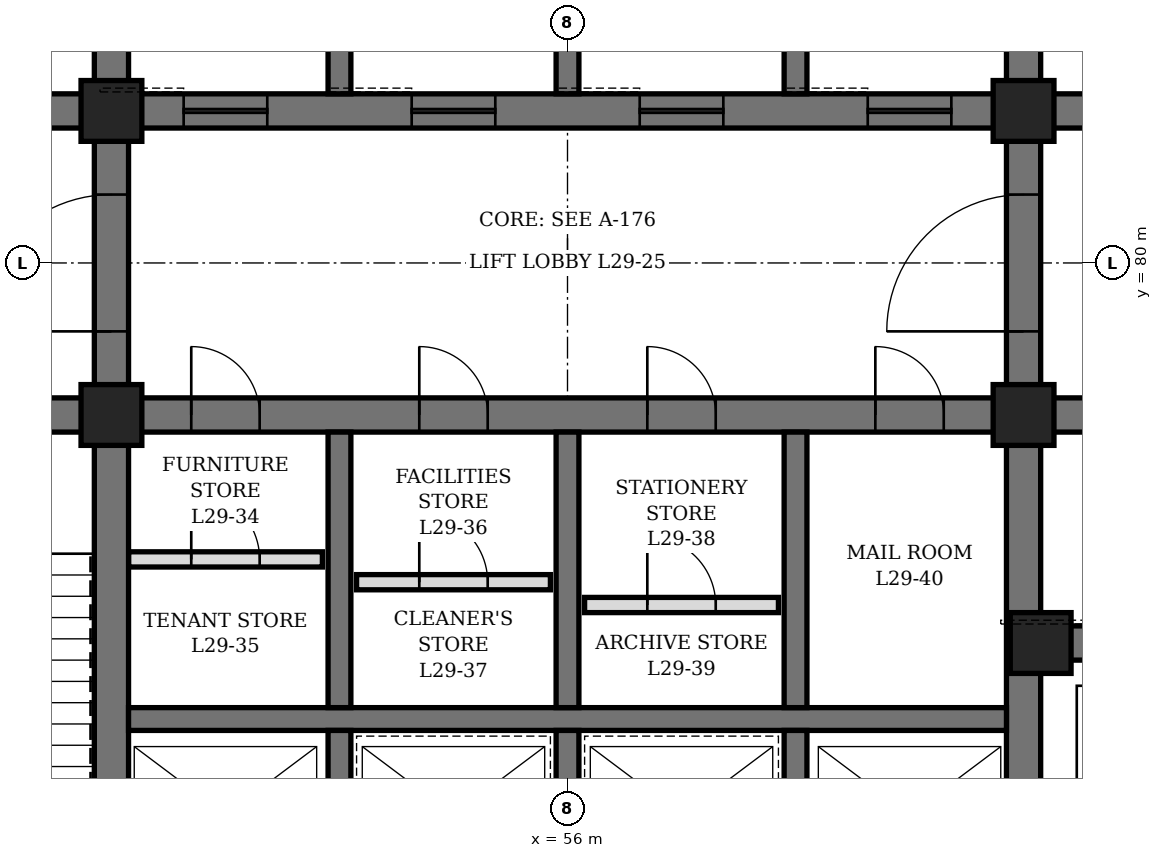
"""IFC4 building model, lengths in metres.
Left out: names, types, materials, properties, quantities, classifications, styles, units other than length and angle.
Written with IfcOpenShell. Run it as: python <this file> out.ifc"""

import sys

from ifc_helpers import new_model, si_unit, direction, frame, frame_2d, origin, origin_2d, place, context, subcontext, project, spatial, rectangle, hollow_rectangle, extrude, element, fill, save


model = new_model("IFC4")
c1 = context("Model", 3, precision=1e-05, world=origin(), true_north=direction((0.0, 1.0)))
c2 = subcontext(c1, "Body", "Model", "MODEL_VIEW")
j1 = project(units=[si_unit("LENGTHUNIT", "METRE"), si_unit("PLANEANGLEUNIT", "RADIAN")], contexts=[c1])
p1 = place(None, origin())
s1 = spatial("IfcSite", under=j1, at=p1, CompositionType="ELEMENT")
p2 = place(p1, origin())
s2 = spatial("IfcBuilding", under=s1, at=p2, CompositionType="ELEMENT")
p3 = place(p2, frame((0.0, 0.0, 133.3)))
s3 = spatial("IfcBuildingStorey", under=s2, at=p3, CompositionType="ELEMENT", Elevation=133.3)
p4 = place(p3, frame((50.0, 71.6, 0.0), z_axis=(0.0, 0.0, 1.0), x_axis=(0.0, 1.0, 0.0)))
e1 = element("IfcWall", 1, at=p4, inside=s3, PredefinedType="SHEAR", context=c2, shape_type="SweptSolid", body=[
    extrude(rectangle(XDim=16.8, YDim=0.45, at=frame_2d((8.4, 0.0))), origin(), (0.0, 0.0, 1.0), 4.2),
])
p5 = place(p4, frame((7.5, 0.0, 0.0)))
e2 = element("IfcOpeningElement", 2, at=p5, cuts=e1, PredefinedType="OPENING", context=c2, shape_type="SweptSolid", body=[
    extrude(rectangle(XDim=1.8, YDim=2.4, at=frame_2d((0.9, 1.2))), frame((0.0, 0.235, 0.0), z_axis=(0.0, -1.0, 0.0), x_axis=(1.0, 0.0, 0.0)), (0.0, 0.0, 1.0), 0.47),
])
p6 = place(p3, frame((62.0, 71.6, 0.0), z_axis=(0.0, 0.0, 1.0), x_axis=(0.0, 1.0, 0.0)))
e3 = element("IfcWall", 3, at=p6, inside=s3, PredefinedType="SHEAR", context=c2, shape_type="SweptSolid", body=[
    extrude(rectangle(XDim=16.8, YDim=0.45, at=frame_2d((8.4, 0.0))), origin(), (0.0, 0.0, 1.0), 4.2),
])
p7 = place(p6, frame((7.5, 0.0, 0.0)))
e4 = element("IfcOpeningElement", 4, at=p7, cuts=e3, PredefinedType="OPENING", context=c2, shape_type="SweptSolid", body=[
    extrude(rectangle(XDim=1.8, YDim=2.4, at=frame_2d((0.9, 1.2))), frame((0.0, 0.235, 0.0), z_axis=(0.0, -1.0, 0.0), x_axis=(1.0, 0.0, 0.0)), (0.0, 0.0, 1.0), 0.47),
])
p8 = place(p3, frame((44.6, 78.0, 0.0), z_axis=(0.0, 0.0, 1.0), x_axis=(1.0, 0.0, 0.0)))
e5 = element("IfcWall", 5, at=p8, inside=s3, PredefinedType="SHEAR", context=c2, shape_type="SweptSolid", body=[
    extrude(rectangle(XDim=5.175, YDim=0.45, at=frame_2d((2.587, 0.0))), origin(), (0.0, 0.0, 1.0), 4.2),
])
p9 = place(p8, frame((1.8, 0.0, 0.0)))
e6 = element("IfcOpeningElement", 6, at=p9, cuts=e5, PredefinedType="OPENING", context=c2, shape_type="SweptSolid", body=[
    extrude(rectangle(XDim=1.2, YDim=2.1, at=frame_2d((0.6, 1.05))), frame((0.0, 0.235, 0.0), z_axis=(0.0, -1.0, 0.0), x_axis=(1.0, 0.0, 0.0)), (0.0, 0.0, 1.0), 0.47),
])
p10 = place(p3, frame((44.6, 82.0, 0.0), z_axis=(0.0, 0.0, 1.0), x_axis=(1.0, 0.0, 0.0)))
e7 = element("IfcWall", 7, at=p10, inside=s3, PredefinedType="SHEAR", context=c2, shape_type="SweptSolid", body=[
    extrude(rectangle(XDim=5.175, YDim=0.45, at=frame_2d((2.587, 0.0))), origin(), (0.0, 0.0, 1.0), 4.2),
])
p11 = place(p10, frame((0.7, 0.0, 0.0)))
e8 = element("IfcOpeningElement", 8, at=p11, cuts=e7, PredefinedType="OPENING", context=c2, shape_type="SweptSolid", body=[
    extrude(rectangle(XDim=0.9, YDim=2.1, at=frame_2d((0.45, 1.05))), frame((0.0, 0.235, 0.0), z_axis=(0.0, -1.0, 0.0), x_axis=(1.0, 0.0, 0.0)), (0.0, 0.0, 1.0), 0.47),
])
p12 = place(p3, frame((62.225, 75.0, 0.0), z_axis=(0.0, 0.0, 1.0), x_axis=(1.0, 0.0, 0.0)))
e9 = element("IfcWall", 9, at=p12, inside=s3, PredefinedType="SHEAR", context=c2, shape_type="SweptSolid", body=[
    extrude(rectangle(XDim=5.175, YDim=0.45, at=frame_2d((2.587, 0.0))), origin(), (0.0, 0.0, 1.0), 4.2),
])
p13 = place(p12, frame((0.675, 0.0, 0.0)))
e10 = element("IfcOpeningElement", 10, at=p13, cuts=e9, PredefinedType="OPENING", context=c2, shape_type="SweptSolid", body=[
    extrude(rectangle(XDim=1.2, YDim=2.2, at=frame_2d((0.6, 1.1))), frame((0.0, 0.235, 0.0), z_axis=(0.0, -1.0, 0.0), x_axis=(1.0, 0.0, 0.0)), (0.0, 0.0, 1.0), 0.47),
])
p14 = place(p12, frame((3.425, 0.0, 0.0)))
e11 = element("IfcOpeningElement", 11, at=p14, cuts=e9, PredefinedType="OPENING", context=c2, shape_type="SweptSolid", body=[
    extrude(rectangle(XDim=1.2, YDim=2.2, at=frame_2d((0.6, 1.1))), frame((0.0, 0.235, 0.0), z_axis=(0.0, -1.0, 0.0), x_axis=(1.0, 0.0, 0.0)), (0.0, 0.0, 1.0), 0.47),
])
p15 = place(p3, frame((62.225, 78.0, 0.0), z_axis=(0.0, 0.0, 1.0), x_axis=(1.0, 0.0, 0.0)))
e12 = element("IfcWall", 12, at=p15, inside=s3, PredefinedType="SHEAR", context=c2, shape_type="SweptSolid", body=[
    extrude(rectangle(XDim=5.175, YDim=0.45, at=frame_2d((2.587, 0.0))), origin(), (0.0, 0.0, 1.0), 4.2),
])
p16 = place(p15, frame((2.175, 0.0, 0.0)))
e13 = element("IfcOpeningElement", 13, at=p16, cuts=e12, PredefinedType="OPENING", context=c2, shape_type="SweptSolid", body=[
    extrude(rectangle(XDim=1.2, YDim=2.1, at=frame_2d((0.6, 1.05))), frame((0.0, 0.235, 0.0), z_axis=(0.0, -1.0, 0.0), x_axis=(1.0, 0.0, 0.0)), (0.0, 0.0, 1.0), 0.47),
])
p17 = place(p3, frame((62.225, 82.0, 0.0), z_axis=(0.0, 0.0, 1.0), x_axis=(1.0, 0.0, 0.0)))
e14 = element("IfcWall", 14, at=p17, inside=s3, PredefinedType="SHEAR", context=c2, shape_type="SweptSolid", body=[
    extrude(rectangle(XDim=5.175, YDim=0.45, at=frame_2d((2.587, 0.0))), origin(), (0.0, 0.0, 1.0), 4.2),
])
p18 = place(p17, frame((2.175, 0.0, 0.0)))
e15 = element("IfcOpeningElement", 15, at=p18, cuts=e14, PredefinedType="OPENING", context=c2, shape_type="SweptSolid", body=[
    extrude(rectangle(XDim=1.2, YDim=2.1, at=frame_2d((0.6, 1.05))), frame((0.0, 0.235, 0.0), z_axis=(0.0, -1.0, 0.0), x_axis=(1.0, 0.0, 0.0)), (0.0, 0.0, 1.0), 0.47),
])
p19 = place(p3, frame((50.225, 78.0, 0.0), z_axis=(0.0, 0.0, 1.0), x_axis=(1.0, 0.0, 0.0)))
e16 = element("IfcWall", 16, at=p19, inside=s3, PredefinedType="SHEAR", context=c2, shape_type="SweptSolid", body=[
    extrude(rectangle(XDim=11.55, YDim=0.45, at=frame_2d((5.775, 0.0))), origin(), (0.0, 0.0, 1.0), 4.2),
])
p20 = place(p19, frame((0.825, 0.0, 0.0)))
e17 = element("IfcOpeningElement", 17, at=p20, cuts=e16, PredefinedType="OPENING", context=c2, shape_type="SweptSolid", body=[
    extrude(rectangle(XDim=0.9, YDim=2.1, at=frame_2d((0.45, 1.05))), frame((0.0, 0.235, 0.0), z_axis=(0.0, -1.0, 0.0), x_axis=(1.0, 0.0, 0.0)), (0.0, 0.0, 1.0), 0.47),
])
p21 = place(p19, frame((3.825, 0.0, 0.0)))
e18 = element("IfcOpeningElement", 18, at=p21, cuts=e16, PredefinedType="OPENING", context=c2, shape_type="SweptSolid", body=[
    extrude(rectangle(XDim=0.9, YDim=2.1, at=frame_2d((0.45, 1.05))), frame((0.0, 0.235, 0.0), z_axis=(0.0, -1.0, 0.0), x_axis=(1.0, 0.0, 0.0)), (0.0, 0.0, 1.0), 0.47),
])
p22 = place(p19, frame((6.825, 0.0, 0.0)))
e19 = element("IfcOpeningElement", 19, at=p22, cuts=e16, PredefinedType="OPENING", context=c2, shape_type="SweptSolid", body=[
    extrude(rectangle(XDim=0.9, YDim=2.1, at=frame_2d((0.45, 1.05))), frame((0.0, 0.235, 0.0), z_axis=(0.0, -1.0, 0.0), x_axis=(1.0, 0.0, 0.0)), (0.0, 0.0, 1.0), 0.47),
])
p23 = place(p19, frame((9.825, 0.0, 0.0)))
e20 = element("IfcOpeningElement", 20, at=p23, cuts=e16, PredefinedType="OPENING", context=c2, shape_type="SweptSolid", body=[
    extrude(rectangle(XDim=0.9, YDim=2.1, at=frame_2d((0.45, 1.05))), frame((0.0, 0.235, 0.0), z_axis=(0.0, -1.0, 0.0), x_axis=(1.0, 0.0, 0.0)), (0.0, 0.0, 1.0), 0.47),
])
p24 = place(p3, frame((50.225, 82.0, 0.0), z_axis=(0.0, 0.0, 1.0), x_axis=(1.0, 0.0, 0.0)))
e21 = element("IfcWall", 21, at=p24, inside=s3, PredefinedType="SHEAR", context=c2, shape_type="SweptSolid", body=[
    extrude(rectangle(XDim=11.55, YDim=0.45, at=frame_2d((5.775, 0.0))), origin(), (0.0, 0.0, 1.0), 4.2),
])
p25 = place(p24, frame((0.725, 0.0, 0.0)))
e22 = element("IfcOpeningElement", 22, at=p25, cuts=e21, PredefinedType="OPENING", context=c2, shape_type="SweptSolid", body=[
    extrude(rectangle(XDim=1.1, YDim=2.2, at=frame_2d((0.55, 1.1))), frame((0.0, 0.235, 0.0), z_axis=(0.0, -1.0, 0.0), x_axis=(1.0, 0.0, 0.0)), (0.0, 0.0, 1.0), 0.47),
])
p26 = place(p24, frame((3.725, 0.0, 0.0)))
e23 = element("IfcOpeningElement", 23, at=p26, cuts=e21, PredefinedType="OPENING", context=c2, shape_type="SweptSolid", body=[
    extrude(rectangle(XDim=1.1, YDim=2.2, at=frame_2d((0.55, 1.1))), frame((0.0, 0.235, 0.0), z_axis=(0.0, -1.0, 0.0), x_axis=(1.0, 0.0, 0.0)), (0.0, 0.0, 1.0), 0.47),
])
p27 = place(p24, frame((6.725, 0.0, 0.0)))
e24 = element("IfcOpeningElement", 24, at=p27, cuts=e21, PredefinedType="OPENING", context=c2, shape_type="SweptSolid", body=[
    extrude(rectangle(XDim=1.1, YDim=2.2, at=frame_2d((0.55, 1.1))), frame((0.0, 0.235, 0.0), z_axis=(0.0, -1.0, 0.0), x_axis=(1.0, 0.0, 0.0)), (0.0, 0.0, 1.0), 0.47),
])
p28 = place(p24, frame((9.725, 0.0, 0.0)))
e25 = element("IfcOpeningElement", 25, at=p28, cuts=e21, PredefinedType="OPENING", context=c2, shape_type="SweptSolid", body=[
    extrude(rectangle(XDim=1.1, YDim=2.2, at=frame_2d((0.55, 1.1))), frame((0.0, 0.235, 0.0), z_axis=(0.0, -1.0, 0.0), x_axis=(1.0, 0.0, 0.0)), (0.0, 0.0, 1.0), 0.47),
])
p29 = place(p3, frame((50.225, 74.0, 0.0), z_axis=(0.0, 0.0, 1.0), x_axis=(1.0, 0.0, 0.0)))
e26 = element("IfcWall", 26, at=p29, inside=s3, PredefinedType="SHEAR", context=c2, shape_type="SweptSolid", body=[
    extrude(rectangle(XDim=11.55, YDim=0.3, at=frame_2d((5.775, 0.0))), origin(), (0.0, 0.0, 1.0), 4.2),
])
p30 = place(p3, frame((53.0, 71.6, 0.0), z_axis=(0.0, 0.0, 1.0), x_axis=(0.0, 1.0, 0.0)))
e27 = element("IfcWall", 27, at=p30, inside=s3, PredefinedType="SHEAR", context=c2, shape_type="SweptSolid", body=[
    extrude(rectangle(XDim=2.25, YDim=0.3, at=frame_2d((1.125, 0.0))), origin(), (0.0, 0.0, 1.0), 4.2),
])
p31 = place(p3, frame((53.0, 74.15, 0.0), z_axis=(0.0, 0.0, 1.0), x_axis=(0.0, 1.0, 0.0)))
e28 = element("IfcWall", 28, at=p31, inside=s3, PredefinedType="SHEAR", context=c2, shape_type="SweptSolid", body=[
    extrude(rectangle(XDim=3.625, YDim=0.3, at=frame_2d((1.812, 0.0))), origin(), (0.0, 0.0, 1.0), 4.2),
])
p32 = place(p3, frame((53.0, 82.225, 0.0), z_axis=(0.0, 0.0, 1.0), x_axis=(0.0, 1.0, 0.0)))
e29 = element("IfcWall", 29, at=p32, inside=s3, PredefinedType="SHEAR", context=c2, shape_type="SweptSolid", body=[
    extrude(rectangle(XDim=3.55, YDim=0.3, at=frame_2d((1.775, 0.0))), origin(), (0.0, 0.0, 1.0), 4.2),
])
p33 = place(p3, frame((56.0, 71.6, 0.0), z_axis=(0.0, 0.0, 1.0), x_axis=(0.0, 1.0, 0.0)))
e30 = element("IfcWall", 30, at=p33, inside=s3, PredefinedType="SHEAR", context=c2, shape_type="SweptSolid", body=[
    extrude(rectangle(XDim=2.25, YDim=0.3, at=frame_2d((1.125, 0.0))), origin(), (0.0, 0.0, 1.0), 4.2),
])
p34 = place(p3, frame((56.0, 74.15, 0.0), z_axis=(0.0, 0.0, 1.0), x_axis=(0.0, 1.0, 0.0)))
e31 = element("IfcWall", 31, at=p34, inside=s3, PredefinedType="SHEAR", context=c2, shape_type="SweptSolid", body=[
    extrude(rectangle(XDim=3.625, YDim=0.3, at=frame_2d((1.812, 0.0))), origin(), (0.0, 0.0, 1.0), 4.2),
])
p35 = place(p3, frame((56.0, 82.225, 0.0), z_axis=(0.0, 0.0, 1.0), x_axis=(0.0, 1.0, 0.0)))
e32 = element("IfcWall", 32, at=p35, inside=s3, PredefinedType="SHEAR", context=c2, shape_type="SweptSolid", body=[
    extrude(rectangle(XDim=3.55, YDim=0.3, at=frame_2d((1.775, 0.0))), origin(), (0.0, 0.0, 1.0), 4.2),
])
p36 = place(p3, frame((59.0, 71.6, 0.0), z_axis=(0.0, 0.0, 1.0), x_axis=(0.0, 1.0, 0.0)))
e33 = element("IfcWall", 33, at=p36, inside=s3, PredefinedType="SHEAR", context=c2, shape_type="SweptSolid", body=[
    extrude(rectangle(XDim=2.25, YDim=0.3, at=frame_2d((1.125, 0.0))), origin(), (0.0, 0.0, 1.0), 4.2),
])
p37 = place(p3, frame((59.0, 74.15, 0.0), z_axis=(0.0, 0.0, 1.0), x_axis=(0.0, 1.0, 0.0)))
e34 = element("IfcWall", 34, at=p37, inside=s3, PredefinedType="SHEAR", context=c2, shape_type="SweptSolid", body=[
    extrude(rectangle(XDim=3.625, YDim=0.3, at=frame_2d((1.812, 0.0))), origin(), (0.0, 0.0, 1.0), 4.2),
])
p38 = place(p3, frame((59.0, 82.225, 0.0), z_axis=(0.0, 0.0, 1.0), x_axis=(0.0, 1.0, 0.0)))
e35 = element("IfcWall", 35, at=p38, inside=s3, PredefinedType="SHEAR", context=c2, shape_type="SweptSolid", body=[
    extrude(rectangle(XDim=3.55, YDim=0.3, at=frame_2d((1.775, 0.0))), origin(), (0.0, 0.0, 1.0), 4.2),
])
for number, where, z_axis, x_axis in (
    (36, (50.0, 78.0, 0.0), (0.0, 0.0, 1.0), (1.0, 0.0, 0.0)),
    (37, (50.0, 82.0, 0.0), (0.0, 0.0, 1.0), (1.0, 0.0, 0.0)),
    (38, (62.0, 78.0, 0.0), (0.0, 0.0, 1.0), (1.0, 0.0, 0.0)),
    (39, (62.0, 82.0, 0.0), (0.0, 0.0, 1.0), (1.0, 0.0, 0.0)),
    (40, (62.225, 75.0, 0.0), (0.0, 0.0, 1.0), (1.0, 0.0, 0.0)),
):
    element("IfcColumn", number, at=place(p3, frame(where, z_axis=z_axis, x_axis=x_axis)), inside=s3, PredefinedType="COLUMN", context=c2, shape_type="SweptSolid", body=[
        extrude(hollow_rectangle(XDim=0.8, YDim=0.8, WallThickness=0.1, at=origin_2d()), origin(), (0.0, 0.0, 1.0), 4.2),
    ])
p39 = place(p3, frame((50.225, 76.1, 0.0), z_axis=(0.0, 0.0, 1.0), x_axis=(1.0, 0.0, 0.0)))
e41 = element("IfcWall", 41, at=p39, inside=s3, PredefinedType="PARTITIONING", context=c2, shape_type="SweptSolid", body=[
    extrude(rectangle(XDim=2.55, YDim=0.2, at=frame_2d((1.275, 0.0))), origin(), (0.0, 0.0, 1.0), 4.04),
])
p40 = place(p39, frame((0.825, 0.0, 0.0)))
e42 = element("IfcOpeningElement", 42, at=p40, cuts=e41, PredefinedType="OPENING", context=c2, shape_type="SweptSolid", body=[
    extrude(rectangle(XDim=0.9, YDim=2.1, at=frame_2d((0.45, 1.05))), frame((0.0, 0.11, 0.0), z_axis=(0.0, -1.0, 0.0), x_axis=(1.0, 0.0, 0.0)), (0.0, 0.0, 1.0), 0.22),
])
p41 = place(p3, frame((53.225, 75.8, 0.0), z_axis=(0.0, 0.0, 1.0), x_axis=(1.0, 0.0, 0.0)))
e43 = element("IfcWall", 43, at=p41, inside=s3, PredefinedType="PARTITIONING", context=c2, shape_type="SweptSolid", body=[
    extrude(rectangle(XDim=2.55, YDim=0.2, at=frame_2d((1.275, 0.0))), origin(), (0.0, 0.0, 1.0), 4.04),
])
p42 = place(p41, frame((0.825, 0.0, 0.0)))
e44 = element("IfcOpeningElement", 44, at=p42, cuts=e43, PredefinedType="OPENING", context=c2, shape_type="SweptSolid", body=[
    extrude(rectangle(XDim=0.9, YDim=2.1, at=frame_2d((0.45, 1.05))), frame((0.0, 0.11, 0.0), z_axis=(0.0, -1.0, 0.0), x_axis=(1.0, 0.0, 0.0)), (0.0, 0.0, 1.0), 0.22),
])
p43 = place(p3, frame((56.225, 75.5, 0.0), z_axis=(0.0, 0.0, 1.0), x_axis=(1.0, 0.0, 0.0)))
e45 = element("IfcWall", 45, at=p43, inside=s3, PredefinedType="PARTITIONING", context=c2, shape_type="SweptSolid", body=[
    extrude(rectangle(XDim=2.55, YDim=0.2, at=frame_2d((1.275, 0.0))), origin(), (0.0, 0.0, 1.0), 4.04),
])
p44 = place(p43, frame((0.825, 0.0, 0.0)))
e46 = element("IfcOpeningElement", 46, at=p44, cuts=e45, PredefinedType="OPENING", context=c2, shape_type="SweptSolid", body=[
    extrude(rectangle(XDim=0.9, YDim=2.1, at=frame_2d((0.45, 1.05))), frame((0.0, 0.11, 0.0), z_axis=(0.0, -1.0, 0.0), x_axis=(1.0, 0.0, 0.0)), (0.0, 0.0, 1.0), 0.22),
])
p45 = place(p20, origin())
e47 = element("IfcDoor", 47, at=p45, inside=s3, OperationType="SINGLE_SWING_LEFT", PredefinedType="DOOR", context=c2, shape_type="SweptSolid", body=[
    extrude(rectangle(XDim=0.9, YDim=2.1, at=frame_2d((0.45, 1.05))), frame((0.0, 0.225, 0.0), z_axis=(0.0, -1.0, 0.0), x_axis=(1.0, 0.0, 0.0)), (0.0, 0.0, 1.0), 0.449),
])
fill(e17, e47)
p46 = place(p40, origin())
e48 = element("IfcDoor", 48, at=p46, inside=s3, OperationType="SINGLE_SWING_LEFT", PredefinedType="DOOR", context=c2, shape_type="SweptSolid", body=[
    extrude(rectangle(XDim=0.9, YDim=2.1, at=frame_2d((0.45, 1.05))), frame((0.0, 0.1, 0.0), z_axis=(0.0, -1.0, 0.0), x_axis=(1.0, 0.0, 0.0)), (0.0, 0.0, 1.0), 0.199),
])
fill(e42, e48)
p47 = place(p21, origin())
e49 = element("IfcDoor", 49, at=p47, inside=s3, OperationType="SINGLE_SWING_LEFT", PredefinedType="DOOR", context=c2, shape_type="SweptSolid", body=[
    extrude(rectangle(XDim=0.9, YDim=2.1, at=frame_2d((0.45, 1.05))), frame((0.0, 0.225, 0.0), z_axis=(0.0, -1.0, 0.0), x_axis=(1.0, 0.0, 0.0)), (0.0, 0.0, 1.0), 0.449),
])
fill(e18, e49)
p48 = place(p42, origin())
e50 = element("IfcDoor", 50, at=p48, inside=s3, OperationType="SINGLE_SWING_LEFT", PredefinedType="DOOR", context=c2, shape_type="SweptSolid", body=[
    extrude(rectangle(XDim=0.9, YDim=2.1, at=frame_2d((0.45, 1.05))), frame((0.0, 0.1, 0.0), z_axis=(0.0, -1.0, 0.0), x_axis=(1.0, 0.0, 0.0)), (0.0, 0.0, 1.0), 0.199),
])
fill(e44, e50)
p49 = place(p22, origin())
e51 = element("IfcDoor", 51, at=p49, inside=s3, OperationType="SINGLE_SWING_LEFT", PredefinedType="DOOR", context=c2, shape_type="SweptSolid", body=[
    extrude(rectangle(XDim=0.9, YDim=2.1, at=frame_2d((0.45, 1.05))), frame((0.0, 0.225, 0.0), z_axis=(0.0, -1.0, 0.0), x_axis=(1.0, 0.0, 0.0)), (0.0, 0.0, 1.0), 0.449),
])
fill(e19, e51)
p50 = place(p44, origin())
e52 = element("IfcDoor", 52, at=p50, inside=s3, OperationType="SINGLE_SWING_LEFT", PredefinedType="DOOR", context=c2, shape_type="SweptSolid", body=[
    extrude(rectangle(XDim=0.9, YDim=2.1, at=frame_2d((0.45, 1.05))), frame((0.0, 0.1, 0.0), z_axis=(0.0, -1.0, 0.0), x_axis=(1.0, 0.0, 0.0)), (0.0, 0.0, 1.0), 0.199),
])
fill(e46, e52)
p51 = place(p23, origin())
e53 = element("IfcDoor", 53, at=p51, inside=s3, OperationType="SINGLE_SWING_LEFT", PredefinedType="DOOR", context=c2, shape_type="SweptSolid", body=[
    extrude(rectangle(XDim=0.9, YDim=2.1, at=frame_2d((0.45, 1.05))), frame((0.0, 0.225, 0.0), z_axis=(0.0, -1.0, 0.0), x_axis=(1.0, 0.0, 0.0)), (0.0, 0.0, 1.0), 0.449),
])
fill(e20, e53)
p52 = place(p5, origin())
e54 = element("IfcDoor", 54, at=p52, inside=s3, OperationType="DOUBLE_DOOR_SINGLE_SWING", PredefinedType="DOOR", context=c2, shape_type="SweptSolid", body=[
    extrude(rectangle(XDim=1.8, YDim=2.4, at=frame_2d((0.9, 1.2))), frame((0.0, 0.225, 0.0), z_axis=(0.0, -1.0, 0.0), x_axis=(1.0, 0.0, 0.0)), (0.0, 0.0, 1.0), 0.449),
])
fill(e2, e54)
p53 = place(p7, origin())
e55 = element("IfcDoor", 55, at=p53, inside=s3, OperationType="DOUBLE_DOOR_SINGLE_SWING", PredefinedType="DOOR", context=c2, shape_type="SweptSolid", body=[
    extrude(rectangle(XDim=1.8, YDim=2.4, at=frame_2d((0.9, 1.2))), frame((0.0, 0.225, 0.0), z_axis=(0.0, -1.0, 0.0), x_axis=(1.0, 0.0, 0.0)), (0.0, 0.0, 1.0), 0.449),
])
fill(e4, e55)
p54 = place(p25, origin())
e56 = element("IfcDoor", 56, at=p54, inside=s3, OperationType="SLIDING_TO_LEFT", PredefinedType="DOOR", context=c2, shape_type="SweptSolid", body=[
    extrude(rectangle(XDim=1.1, YDim=2.2, at=frame_2d((0.55, 1.1))), frame((0.0, 0.225, 0.0), z_axis=(0.0, -1.0, 0.0), x_axis=(1.0, 0.0, 0.0)), (0.0, 0.0, 1.0), 0.449),
])
fill(e22, e56)
p55 = place(p26, origin())
e57 = element("IfcDoor", 57, at=p55, inside=s3, OperationType="SLIDING_TO_LEFT", PredefinedType="DOOR", context=c2, shape_type="SweptSolid", body=[
    extrude(rectangle(XDim=1.1, YDim=2.2, at=frame_2d((0.55, 1.1))), frame((0.0, 0.225, 0.0), z_axis=(0.0, -1.0, 0.0), x_axis=(1.0, 0.0, 0.0)), (0.0, 0.0, 1.0), 0.449),
])
fill(e23, e57)
p56 = place(p27, origin())
e58 = element("IfcDoor", 58, at=p56, inside=s3, OperationType="SLIDING_TO_LEFT", PredefinedType="DOOR", context=c2, shape_type="SweptSolid", body=[
    extrude(rectangle(XDim=1.1, YDim=2.2, at=frame_2d((0.55, 1.1))), frame((0.0, 0.225, 0.0), z_axis=(0.0, -1.0, 0.0), x_axis=(1.0, 0.0, 0.0)), (0.0, 0.0, 1.0), 0.449),
])
fill(e24, e58)
p57 = place(p28, origin())
e59 = element("IfcDoor", 59, at=p57, inside=s3, OperationType="SLIDING_TO_LEFT", PredefinedType="DOOR", context=c2, shape_type="SweptSolid", body=[
    extrude(rectangle(XDim=1.1, YDim=2.2, at=frame_2d((0.55, 1.1))), frame((0.0, 0.225, 0.0), z_axis=(0.0, -1.0, 0.0), x_axis=(1.0, 0.0, 0.0)), (0.0, 0.0, 1.0), 0.449),
])
fill(e25, e59)
save(model, sys.argv[1])
